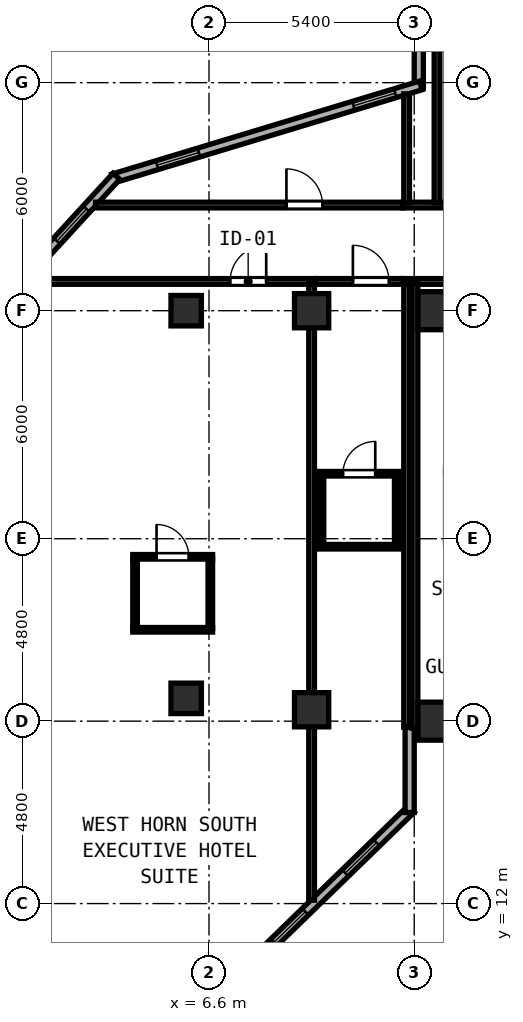
"""IFC4 building model, lengths in metres.
Left out: names, types, materials, properties, quantities, classifications, styles, units other than length and angle.
Written with IfcOpenShell. Run it as: python <this file> out.ifc"""

import sys

from ifc_helpers import new_model, si_unit, direction, frame, frame_2d, origin, origin_2d, place, context, subcontext, project, spatial, rectangle, hollow_rectangle, extrude, element, fill, save


model = new_model("IFC4")
c1 = context("Model", 3, precision=1e-05, world=origin(), true_north=direction((0.0, 1.0)))
c2 = subcontext(c1, "Body", "Model", "MODEL_VIEW")
j1 = project(units=[si_unit("LENGTHUNIT", "METRE"), si_unit("PLANEANGLEUNIT", "RADIAN")], contexts=[c1])
p1 = place(None, origin())
s1 = spatial("IfcSite", under=j1, at=p1, CompositionType="ELEMENT")
p2 = place(p1, origin())
s2 = spatial("IfcBuilding", under=s1, at=p2, CompositionType="ELEMENT")
p3 = place(p2, frame((0.0, 0.0, 121.2)))
s3 = spatial("IfcBuildingStorey", under=s2, at=p3, CompositionType="ELEMENT", Elevation=121.2)
for number, where, z_axis, x_axis in (
    (1, (12.6, 16.8, 0.0), (0.0, 0.0, 1.0), (1.0, 0.0, 0.0)),
    (2, (12.6, 27.6, 0.0), (0.0, 0.0, 1.0), (1.0, 0.0, 0.0)),
):
    element("IfcColumn", number, at=place(p3, frame(where, z_axis=z_axis, x_axis=x_axis)), inside=s3, PredefinedType="COLUMN", context=c2, shape_type="SweptSolid", body=[
        extrude(hollow_rectangle(XDim=1.0, YDim=1.0, WallThickness=0.038, at=origin_2d()), origin(), (0.0, 0.0, 1.0), 3.8),
    ])
for number, where, z_axis, x_axis in (
    (3, (6.0, 17.4, 0.0), (0.0, 0.0, 1.0), (1.0, 0.0, 0.0)),
    (4, (6.0, 27.6, 0.0), (0.0, 0.0, 1.0), (1.0, 0.0, 0.0)),
):
    element("IfcColumn", number, at=place(p3, frame(where, z_axis=z_axis, x_axis=x_axis)), inside=s3, PredefinedType="COLUMN", context=c2, shape_type="SweptSolid", body=[
        extrude(hollow_rectangle(XDim=0.8, YDim=0.8, WallThickness=0.03, at=origin_2d()), origin(), (0.0, 0.0, 1.0), 3.8),
    ])
for number, where, z_axis, x_axis in (
    (5, (9.3, 17.1, 0.0), (0.0, 0.0, 1.0), (1.0, 0.0, 0.0)),
    (6, (9.3, 27.6, 0.0), (0.0, 0.0, 1.0), (1.0, 0.0, 0.0)),
):
    element("IfcColumn", number, at=place(p3, frame(where, z_axis=z_axis, x_axis=x_axis)), inside=s3, PredefinedType="COLUMN", context=c2, shape_type="SweptSolid", body=[
        extrude(hollow_rectangle(XDim=0.9, YDim=0.9, WallThickness=0.034, at=origin_2d()), origin(), (0.0, 0.0, 1.0), 3.8),
    ])
p4 = place(p3, frame((12.12, 37.535, 0.0), z_axis=(0.0, 0.0, 1.0), x_axis=(0.0, -1.0, 0.0)))
e7 = element("IfcWall", 7, at=p4, inside=s3, PredefinedType="SOLIDWALL", context=c2, shape_type="SweptSolid", body=[
    extrude(rectangle(XDim=4.079, YDim=0.24, at=frame_2d((2.04, 0.0))), origin(), (0.0, 0.0, 1.0), 3.6),
])
p5 = place(p4, frame((0.7, 0.0, 0.85)))
e8 = element("IfcOpeningElement", 8, at=p5, cuts=e7, PredefinedType="OPENING", context=c2, shape_type="SweptSolid", body=[
    extrude(rectangle(XDim=1.15, YDim=1.8, at=frame_2d((0.575, 0.9))), frame((0.0, 0.13, 0.0), z_axis=(0.0, -1.0, 0.0), x_axis=(1.0, 0.0, 0.0)), (0.0, 0.0, 1.0), 0.26),
])
p6 = place(p3, frame((12.173, 33.527, 0.0), z_axis=(0.0, 0.0, 1.0), x_axis=(-0.957230199513, -0.289327401294, 0.0)))
e9 = element("IfcWall", 9, at=p6, inside=s3, PredefinedType="SOLIDWALL", context=c2, shape_type="SweptSolid", body=[
    extrude(rectangle(XDim=8.461, YDim=0.24, at=frame_2d((4.23, 0.0))), origin(), (0.0, 0.0, 1.0), 3.6),
])
p7 = place(p6, frame((0.7, 0.0, 0.85)))
e10 = element("IfcOpeningElement", 10, at=p7, cuts=e9, PredefinedType="OPENING", context=c2, shape_type="SweptSolid", body=[
    extrude(rectangle(XDim=1.15, YDim=1.8, at=frame_2d((0.575, 0.9))), frame((0.0, 0.13, 0.0), z_axis=(0.0, -1.0, 0.0), x_axis=(1.0, 0.0, 0.0)), (0.0, 0.0, 1.0), 0.26),
])
p8 = place(p6, frame((6.1, 0.0, 0.85)))
e11 = element("IfcOpeningElement", 11, at=p8, cuts=e9, PredefinedType="OPENING", context=c2, shape_type="SweptSolid", body=[
    extrude(rectangle(XDim=1.15, YDim=1.8, at=frame_2d((0.575, 0.9))), frame((0.0, 0.13, 0.0), z_axis=(0.0, -1.0, 0.0), x_axis=(1.0, 0.0, 0.0)), (0.0, 0.0, 1.0), 0.26),
])
p9 = place(p3, frame((4.163, 31.135, 0.0), z_axis=(0.0, 0.0, 1.0), x_axis=(-0.675717899837, -0.737160308101, 0.0)))
e12 = element("IfcWall", 12, at=p9, inside=s3, PredefinedType="SOLIDWALL", context=c2, shape_type="SweptSolid", body=[
    extrude(rectangle(XDim=3.286, YDim=0.24, at=frame_2d((1.643, 0.0))), origin(), (0.0, 0.0, 1.0), 3.6),
])
p10 = place(p9, frame((1.163, 0.0, 0.85)))
e13 = element("IfcOpeningElement", 13, at=p10, cuts=e12, PredefinedType="OPENING", context=c2, shape_type="SweptSolid", body=[
    extrude(rectangle(XDim=1.15, YDim=1.8, at=frame_2d((0.575, 0.9))), frame((0.0, 0.13, 0.0), z_axis=(0.0, -1.0, 0.0), x_axis=(1.0, 0.0, 0.0)), (0.0, 0.0, 1.0), 0.26),
])
p11 = place(p3, frame((3.938, 6.734, 0.0), z_axis=(0.0, 0.0, 1.0), x_axis=(0.717223616435, 0.696843084222, 0.0)))
e14 = element("IfcWall", 14, at=p11, inside=s3, PredefinedType="SOLIDWALL", context=c2, shape_type="SweptSolid", body=[
    extrude(rectangle(XDim=11.129, YDim=0.24, at=frame_2d((5.564, 0.0))), origin(), (0.0, 0.0, 1.0), 3.6),
])
p12 = place(p11, frame((0.7, 0.0, 0.85)))
e15 = element("IfcOpeningElement", 15, at=p12, cuts=e14, PredefinedType="OPENING", context=c2, shape_type="SweptSolid", body=[
    extrude(rectangle(XDim=1.15, YDim=1.8, at=frame_2d((0.575, 0.9))), frame((0.0, 0.13, 0.0), z_axis=(0.0, -1.0, 0.0), x_axis=(1.0, 0.0, 0.0)), (0.0, 0.0, 1.0), 0.26),
])
p13 = place(p11, frame((6.1, 0.0, 0.85)))
e16 = element("IfcOpeningElement", 16, at=p13, cuts=e14, PredefinedType="OPENING", context=c2, shape_type="SweptSolid", body=[
    extrude(rectangle(XDim=1.15, YDim=1.8, at=frame_2d((0.575, 0.9))), frame((0.0, 0.13, 0.0), z_axis=(0.0, -1.0, 0.0), x_axis=(1.0, 0.0, 0.0)), (0.0, 0.0, 1.0), 0.26),
])
p14 = place(p11, frame((8.709, 0.0, 0.85)))
e17 = element("IfcOpeningElement", 17, at=p14, cuts=e14, PredefinedType="OPENING", context=c2, shape_type="SweptSolid", body=[
    extrude(rectangle(XDim=1.15, YDim=1.8, at=frame_2d((0.575, 0.9))), frame((0.0, 0.13, 0.0), z_axis=(0.0, -1.0, 0.0), x_axis=(1.0, 0.0, 0.0)), (0.0, 0.0, 1.0), 0.26),
])
p15 = place(p3, frame((11.88, 14.396, 0.0), z_axis=(0.0, 0.0, 1.0), x_axis=(0.0, 1.0, 0.0)))
e18 = element("IfcWall", 18, at=p15, inside=s3, PredefinedType="SOLIDWALL", context=c2, shape_type="SweptSolid", body=[
    extrude(rectangle(XDim=2.244, YDim=0.24, at=frame_2d((1.122, 0.0))), origin(), (0.0, 0.0, 1.0), 3.6),
])
p16 = place(p3, frame((11.7, 30.38, 0.0), z_axis=(0.0, 0.0, 1.0), x_axis=(1.0, 0.0, 0.0)))
e19 = element("IfcWall", 19, at=p16, inside=s3, PredefinedType="PARTITIONING", context=c2, shape_type="SweptSolid", body=[
    extrude(rectangle(XDim=4.35, YDim=0.15, at=frame_2d((2.175, 0.0))), origin(), (0.0, 0.0, 1.0), 3.6),
])
p17 = place(p16, frame((3.13, 0.0, 0.0)))
e20 = element("IfcOpeningElement", 20, at=p17, cuts=e19, PredefinedType="OPENING", context=c2, shape_type="SweptSolid", body=[
    extrude(rectangle(XDim=0.95, YDim=2.15, at=frame_2d((0.475, 1.075))), frame((0.0, 0.085, 0.0), z_axis=(0.0, -1.0, 0.0), x_axis=(1.0, 0.0, 0.0)), (0.0, 0.0, 1.0), 0.17),
])
p18 = place(p3, frame((11.8, 30.44, 0.0), z_axis=(0.0, 0.0, 1.0), x_axis=(0.0, 1.0, 0.0)))
e21 = element("IfcWall", 21, at=p18, inside=s3, PredefinedType="PARTITIONING", context=c2, shape_type="SweptSolid", body=[
    extrude(rectangle(XDim=2.865, YDim=0.15, at=frame_2d((1.432, 0.0))), origin(), (0.0, 0.0, 1.0), 3.6),
])
p19 = place(p3, frame((11.7, 28.37, 0.0), z_axis=(0.0, 0.0, 1.0), x_axis=(1.0, 0.0, 0.0)))
e22 = element("IfcWall", 22, at=p19, inside=s3, PredefinedType="PARTITIONING", context=c2, shape_type="SweptSolid", body=[
    extrude(rectangle(XDim=4.35, YDim=0.15, at=frame_2d((2.175, 0.0))), origin(), (0.0, 0.0, 1.0), 3.6),
])
p20 = place(p19, frame((4.08, 0.0, 0.0), z_axis=(0.0, 0.0, 1.0), x_axis=(-1.0, 0.0, 0.0)))
e23 = element("IfcOpeningElement", 23, at=p20, cuts=e22, PredefinedType="OPENING", context=c2, shape_type="SweptSolid", body=[
    extrude(rectangle(XDim=0.95, YDim=2.15, at=frame_2d((0.475, 1.075))), frame((0.0, 0.085, 0.0), z_axis=(0.0, -1.0, 0.0), x_axis=(1.0, 0.0, 0.0)), (0.0, 0.0, 1.0), 0.17),
])
p21 = place(p3, frame((11.8, 16.642, 0.0), z_axis=(0.0, 0.0, 1.0), x_axis=(0.0, 1.0, 0.0)))
e24 = element("IfcWall", 24, at=p21, inside=s3, PredefinedType="PARTITIONING", context=c2, shape_type="SweptSolid", body=[
    extrude(rectangle(XDim=11.668, YDim=0.15, at=frame_2d((5.834, 0.0))), origin(), (0.0, 0.0, 1.0), 3.6),
])
p22 = place(p3, frame((2.085, 28.37, 0.0), z_axis=(0.0, 0.0, 1.0), x_axis=(1.0, 0.0, 0.0)))
e25 = element("IfcWall", 25, at=p22, inside=s3, PredefinedType="PARTITIONING", context=c2, shape_type="SweptSolid", body=[
    extrude(rectangle(XDim=7.315, YDim=0.15, at=frame_2d((3.657, 0.0))), origin(), (0.0, 0.0, 1.0), 3.6),
])
p23 = place(p22, frame((6.021, 0.0, 0.0), z_axis=(0.0, 0.0, 1.0), x_axis=(-1.0, 0.0, 0.0)))
e26 = element("IfcOpeningElement", 26, at=p23, cuts=e25, PredefinedType="OPENING", context=c2, shape_type="SweptSolid", body=[
    extrude(rectangle(XDim=0.95, YDim=2.18, at=frame_2d((0.475, 1.09))), frame((0.0, 0.085, 0.0), z_axis=(0.0, -1.0, 0.0), x_axis=(1.0, 0.0, 0.0)), (0.0, 0.0, 1.0), 0.17),
])
p24 = place(p3, frame((9.3, 12.09, 0.0), z_axis=(0.0, 0.0, 1.0), x_axis=(0.0, 1.0, 0.0)))
e27 = element("IfcWall", 27, at=p24, inside=s3, PredefinedType="PARTITIONING", context=c2, shape_type="SweptSolid", body=[
    extrude(rectangle(XDim=16.22, YDim=0.15, at=frame_2d((8.11, 0.0))), origin(), (0.0, 0.0, 1.0), 3.6),
])
p25 = place(p3, frame((4.595, 21.124, 0.0), z_axis=(0.0, 0.0, 1.0), x_axis=(1.0, 0.0, 0.0)))
e28 = element("IfcWall", 28, at=p25, inside=s3, PredefinedType="PARTITIONING", context=c2, shape_type="SweptSolid", body=[
    extrude(rectangle(XDim=2.1, YDim=0.12, at=frame_2d((1.05, 0.0))), origin(), (0.0, 0.0, 1.0), 3.6),
])
p26 = place(p25, frame((1.475, 0.0, 0.0), z_axis=(0.0, 0.0, 1.0), x_axis=(-1.0, 0.0, 0.0)))
e29 = element("IfcOpeningElement", 29, at=p26, cuts=e28, PredefinedType="OPENING", context=c2, shape_type="SweptSolid", body=[
    extrude(rectangle(XDim=0.85, YDim=2.1, at=frame_2d((0.425, 1.05))), frame((0.0, 0.07, 0.0), z_axis=(0.0, -1.0, 0.0), x_axis=(1.0, 0.0, 0.0)), (0.0, 0.0, 1.0), 0.14),
])
p27 = place(p3, frame((4.595, 19.204, 0.0), z_axis=(0.0, 0.0, 1.0), x_axis=(1.0, 0.0, 0.0)))
e30 = element("IfcWall", 30, at=p27, inside=s3, PredefinedType="PARTITIONING", context=c2, shape_type="SweptSolid", body=[
    extrude(rectangle(XDim=2.1, YDim=0.12, at=frame_2d((1.05, 0.0))), origin(), (0.0, 0.0, 1.0), 3.6),
])
for number, where, z_axis, x_axis in (
    (31, (4.655, 19.249, 0.0), (0.0, 0.0, 1.0), (0.0, 1.0, 0.0)),
    (32, (6.635, 19.249, 0.0), (0.0, 0.0, 1.0), (0.0, 1.0, 0.0)),
):
    element("IfcWall", number, at=place(p3, frame(where, z_axis=z_axis, x_axis=x_axis)), inside=s3, PredefinedType="PARTITIONING", context=c2, shape_type="SweptSolid", body=[
        extrude(rectangle(XDim=1.83, YDim=0.12, at=frame_2d((0.915, 0.0))), origin(), (0.0, 0.0, 1.0), 3.6),
    ])
p28 = place(p3, frame((9.402, 28.37, 0.0), z_axis=(0.0, 0.0, 1.0), x_axis=(1.0, 0.0, 0.0)))
e33 = element("IfcWall", 33, at=p28, inside=s3, PredefinedType="PARTITIONING", context=c2, shape_type="SweptSolid", body=[
    extrude(rectangle(XDim=2.296, YDim=0.15, at=frame_2d((1.148, 0.0))), origin(), (0.0, 0.0, 1.0), 3.6),
])
p29 = place(p28, frame((1.934, 0.0, 0.0), z_axis=(0.0, 0.0, 1.0), x_axis=(-1.0, 0.0, 0.0)))
e34 = element("IfcOpeningElement", 34, at=p29, cuts=e33, PredefinedType="OPENING", context=c2, shape_type="SweptSolid", body=[
    extrude(rectangle(XDim=0.95, YDim=2.15, at=frame_2d((0.475, 1.075))), frame((0.0, 0.085, 0.0), z_axis=(0.0, -1.0, 0.0), x_axis=(1.0, 0.0, 0.0)), (0.0, 0.0, 1.0), 0.17),
])
p30 = place(p3, frame((12.02, 16.612, 0.0), z_axis=(0.0, 0.0, 1.0), x_axis=(0.0, 1.0, 0.0)))
e35 = element("IfcWall", 35, at=p30, inside=s3, PredefinedType="PARTITIONING", context=c2, shape_type="SweptSolid", body=[
    extrude(rectangle(XDim=11.698, YDim=0.15, at=frame_2d((5.849, 0.0))), origin(), (0.0, 0.0, 1.0), 3.6),
])
p31 = place(p3, frame((9.5, 23.31, 0.0), z_axis=(0.0, 0.0, 1.0), x_axis=(1.0, 0.0, 0.0)))
e36 = element("IfcWall", 36, at=p31, inside=s3, PredefinedType="PARTITIONING", context=c2, shape_type="SweptSolid", body=[
    extrude(rectangle(XDim=2.1, YDim=0.12, at=frame_2d((1.05, 0.0))), origin(), (0.0, 0.0, 1.0), 3.6),
])
p32 = place(p31, frame((1.475, 0.0, 0.0), z_axis=(0.0, 0.0, 1.0), x_axis=(-1.0, 0.0, 0.0)))
e37 = element("IfcOpeningElement", 37, at=p32, cuts=e36, PredefinedType="OPENING", context=c2, shape_type="SweptSolid", body=[
    extrude(rectangle(XDim=0.85, YDim=2.1, at=frame_2d((0.425, 1.05))), frame((0.0, 0.07, 0.0), z_axis=(0.0, -1.0, 0.0), x_axis=(1.0, 0.0, 0.0)), (0.0, 0.0, 1.0), 0.14),
])
p33 = place(p3, frame((9.5, 21.39, 0.0), z_axis=(0.0, 0.0, 1.0), x_axis=(1.0, 0.0, 0.0)))
e38 = element("IfcWall", 38, at=p33, inside=s3, PredefinedType="PARTITIONING", context=c2, shape_type="SweptSolid", body=[
    extrude(rectangle(XDim=2.1, YDim=0.12, at=frame_2d((1.05, 0.0))), origin(), (0.0, 0.0, 1.0), 3.6),
])
for number, where, z_axis, x_axis in (
    (39, (9.56, 21.435, 0.0), (0.0, 0.0, 1.0), (0.0, 1.0, 0.0)),
    (40, (11.54, 21.435, 0.0), (0.0, 0.0, 1.0), (0.0, 1.0, 0.0)),
):
    element("IfcWall", number, at=place(p3, frame(where, z_axis=z_axis, x_axis=x_axis)), inside=s3, PredefinedType="PARTITIONING", context=c2, shape_type="SweptSolid", body=[
        extrude(rectangle(XDim=1.83, YDim=0.12, at=frame_2d((0.915, 0.0))), origin(), (0.0, 0.0, 1.0), 3.6),
    ])
p34 = place(p3, frame((3.614, 30.38, 0.0), z_axis=(0.0, 0.0, 1.0), x_axis=(1.0, 0.0, 0.0)))
e41 = element("IfcWall", 41, at=p34, inside=s3, PredefinedType="PARTITIONING", context=c2, shape_type="SweptSolid", body=[
    extrude(rectangle(XDim=8.084, YDim=0.15, at=frame_2d((4.042, 0.0))), origin(), (0.0, 0.0, 1.0), 3.6),
])
p35 = place(p34, frame((5.024, 0.0, 0.0)))
e42 = element("IfcOpeningElement", 42, at=p35, cuts=e41, PredefinedType="OPENING", context=c2, shape_type="SweptSolid", body=[
    extrude(rectangle(XDim=0.95, YDim=2.12, at=frame_2d((0.475, 1.06))), frame((0.0, 0.085, 0.0), z_axis=(0.0, -1.0, 0.0), x_axis=(1.0, 0.0, 0.0)), (0.0, 0.0, 1.0), 0.17),
])
p36 = place(p3, frame((12.6, 30.44, 0.0), z_axis=(0.0, 0.0, 1.0), x_axis=(0.0, 1.0, 0.0)))
e43 = element("IfcWall", 43, at=p36, inside=s3, PredefinedType="PARTITIONING", context=c2, shape_type="SweptSolid", body=[
    extrude(rectangle(XDim=4.1, YDim=0.15, at=frame_2d((2.05, 0.0))), origin(), (0.0, 0.0, 1.0), 3.6),
])
p37 = place(p7, origin())
e44 = element("IfcWindow", 44, at=p37, inside=s3, PartitioningType="SINGLE_PANEL", PredefinedType="WINDOW", context=c2, shape_type="SweptSolid", body=[
    extrude(rectangle(XDim=1.15, YDim=1.8, at=frame_2d((0.575, 0.9))), frame((0.0, 0.03, 0.0), z_axis=(0.0, -1.0, 0.0), x_axis=(1.0, 0.0, 0.0)), (0.0, 0.0, 1.0), 0.06),
])
fill(e10, e44)
p38 = place(p8, origin())
e45 = element("IfcWindow", 45, at=p38, inside=s3, PartitioningType="SINGLE_PANEL", PredefinedType="WINDOW", context=c2, shape_type="SweptSolid", body=[
    extrude(rectangle(XDim=1.15, YDim=1.8, at=frame_2d((0.575, 0.9))), frame((0.0, 0.03, 0.0), z_axis=(0.0, -1.0, 0.0), x_axis=(1.0, 0.0, 0.0)), (0.0, 0.0, 1.0), 0.06),
])
fill(e11, e45)
p39 = place(p10, origin())
e46 = element("IfcWindow", 46, at=p39, inside=s3, PartitioningType="SINGLE_PANEL", PredefinedType="WINDOW", context=c2, shape_type="SweptSolid", body=[
    extrude(rectangle(XDim=1.15, YDim=1.8, at=frame_2d((0.575, 0.9))), frame((0.0, 0.03, 0.0), z_axis=(0.0, -1.0, 0.0), x_axis=(1.0, 0.0, 0.0)), (0.0, 0.0, 1.0), 0.06),
])
fill(e13, e46)
p40 = place(p13, origin())
e47 = element("IfcWindow", 47, at=p40, inside=s3, PartitioningType="SINGLE_PANEL", PredefinedType="WINDOW", context=c2, shape_type="SweptSolid", body=[
    extrude(rectangle(XDim=1.15, YDim=1.8, at=frame_2d((0.575, 0.9))), frame((0.0, 0.03, 0.0), z_axis=(0.0, -1.0, 0.0), x_axis=(1.0, 0.0, 0.0)), (0.0, 0.0, 1.0), 0.06),
])
fill(e16, e47)
p41 = place(p23, origin())
e48 = element("IfcDoor", 48, at=p41, inside=s3, OperationType="SINGLE_SWING_LEFT", PredefinedType="DOOR", context=c2, shape_type="SweptSolid", body=[
    extrude(rectangle(XDim=0.95, YDim=2.18, at=frame_2d((0.475, 1.09))), frame((0.0, 0.025, 0.0), z_axis=(0.0, -1.0, 0.0), x_axis=(1.0, 0.0, 0.0)), (0.0, 0.0, 1.0), 0.05),
])
fill(e26, e48)
p42 = place(p26, origin())
e49 = element("IfcDoor", 49, at=p42, inside=s3, OperationType="SINGLE_SWING_RIGHT", PredefinedType="DOOR", context=c2, shape_type="SweptSolid", body=[
    extrude(rectangle(XDim=0.85, YDim=2.1, at=frame_2d((0.425, 1.05))), frame((0.0, 0.025, 0.0), z_axis=(0.0, -1.0, 0.0), x_axis=(1.0, 0.0, 0.0)), (0.0, 0.0, 1.0), 0.05),
])
fill(e29, e49)
p43 = place(p29, origin())
e50 = element("IfcDoor", 50, at=p43, inside=s3, OperationType="SINGLE_SWING_RIGHT", PredefinedType="DOOR", context=c2, shape_type="SweptSolid", body=[
    extrude(rectangle(XDim=0.95, YDim=2.15, at=frame_2d((0.475, 1.075))), frame((0.0, 0.025, 0.0), z_axis=(0.0, -1.0, 0.0), x_axis=(1.0, 0.0, 0.0)), (0.0, 0.0, 1.0), 0.05),
])
fill(e34, e50)
p44 = place(p32, origin())
e51 = element("IfcDoor", 51, at=p44, inside=s3, OperationType="SINGLE_SWING_LEFT", PredefinedType="DOOR", context=c2, shape_type="SweptSolid", body=[
    extrude(rectangle(XDim=0.85, YDim=2.1, at=frame_2d((0.425, 1.05))), frame((0.0, 0.025, 0.0), z_axis=(0.0, -1.0, 0.0), x_axis=(1.0, 0.0, 0.0)), (0.0, 0.0, 1.0), 0.05),
])
fill(e37, e51)
p45 = place(p35, origin())
e52 = element("IfcDoor", 52, at=p45, inside=s3, OperationType="SINGLE_SWING_LEFT", PredefinedType="DOOR", context=c2, shape_type="SweptSolid", body=[
    extrude(rectangle(XDim=0.95, YDim=2.12, at=frame_2d((0.475, 1.06))), frame((0.0, 0.025, 0.0), z_axis=(0.0, -1.0, 0.0), x_axis=(1.0, 0.0, 0.0)), (0.0, 0.0, 1.0), 0.05),
])
fill(e42, e52)
p46 = place(p14, origin())
e53 = element("IfcWindow", 53, at=p46, inside=s3, PartitioningType="SINGLE_PANEL", PredefinedType="WINDOW", context=c2, shape_type="SweptSolid", body=[
    extrude(rectangle(XDim=1.15, YDim=1.8, at=frame_2d((0.575, 0.9))), frame((0.0, 0.03, 0.0), z_axis=(0.0, -1.0, 0.0), x_axis=(1.0, 0.0, 0.0)), (0.0, 0.0, 1.0), 0.06),
])
fill(e17, e53)
save(model, sys.argv[1])
